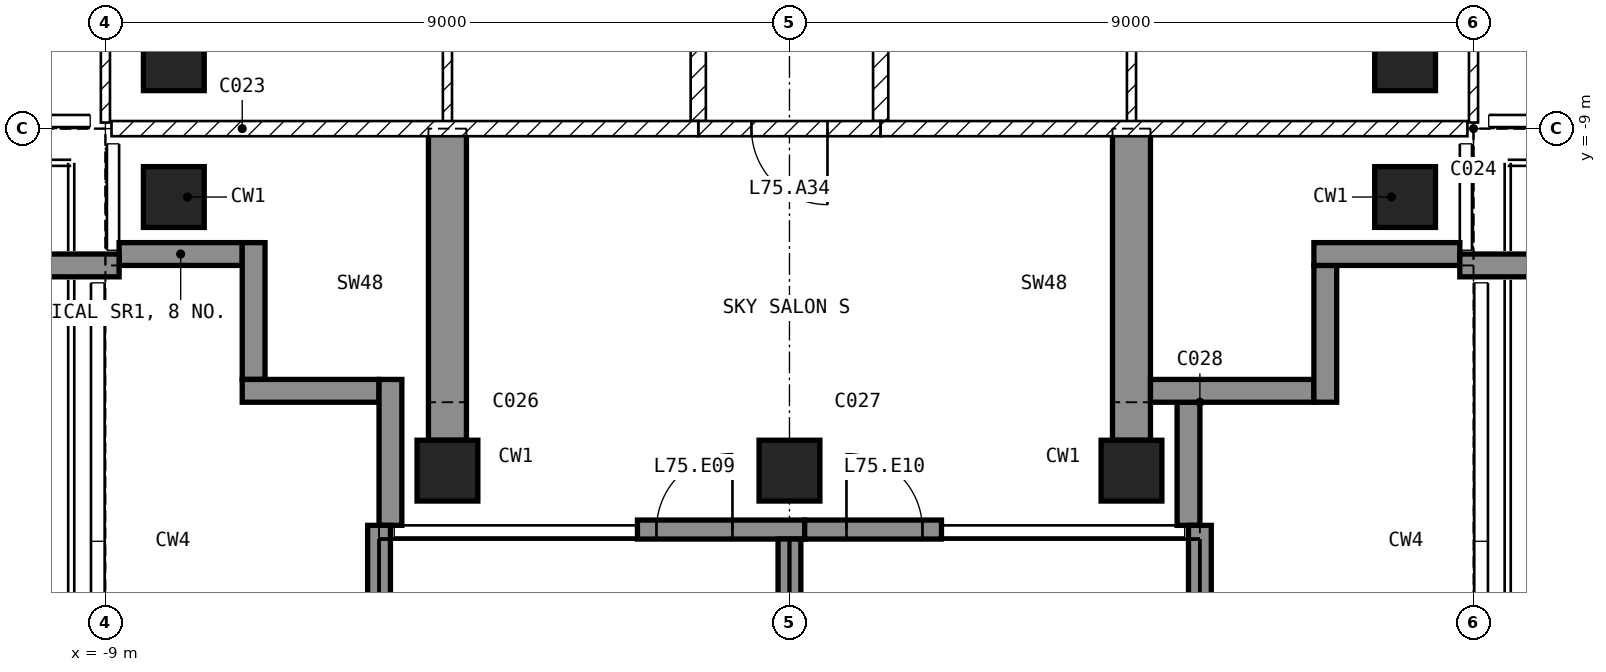
"""IFC4 building model, lengths in metres.
Left out: names, types, materials, properties, quantities, classifications, styles, units other than length and angle.
Written with IfcOpenShell. Run it as: python <this file> out.ifc"""

import sys

from ifc_helpers import new_model, si_unit, direction, frame, frame_2d, origin, origin_2d, place, context, subcontext, project, spatial, polyline, rectangle, outline, extrude, element, fill, save


model = new_model("IFC4")
c1 = context("Model", 3, precision=1e-05, world=origin(), true_north=direction((0.0, 1.0)))
c2 = subcontext(c1, "Body", "Model", "MODEL_VIEW")
j1 = project(units=[si_unit("LENGTHUNIT", "METRE"), si_unit("PLANEANGLEUNIT", "RADIAN")], contexts=[c1])
p1 = place(None, origin())
s1 = spatial("IfcSite", under=j1, at=p1, CompositionType="ELEMENT")
p2 = place(p1, origin())
s2 = spatial("IfcBuilding", under=s1, at=p2, CompositionType="ELEMENT")
p3 = place(p2, frame((0.0, 0.0, 294.6)))
s3 = spatial("IfcBuildingStorey", under=s2, at=p3, CompositionType="ELEMENT", Elevation=294.6)
for number, where, z_axis, x_axis in (
    (1, (-8.1, -9.9, -0.25), (0.0, 0.0, 1.0), (1.0, 0.0, 0.0)),
    (2, (-8.1, -8.1, -0.25), (0.0, 0.0, 1.0), (1.0, 0.0, 0.0)),
    (3, (-4.5, -13.5, -0.25), (0.0, 0.0, 1.0), (1.0, 0.0, 0.0)),
    (4, (0.0, -13.5, -0.25), (0.0, 0.0, 1.0), (1.0, 0.0, 0.0)),
    (5, (4.5, -13.5, -0.25), (0.0, 0.0, 1.0), (1.0, 0.0, 0.0)),
    (6, (8.1, -9.9, -0.25), (0.0, 0.0, 1.0), (1.0, 0.0, 0.0)),
    (7, (8.1, -8.1, -0.25), (0.0, 0.0, 1.0), (1.0, 0.0, 0.0)),
):
    element("IfcColumn", number, at=place(p3, frame(where, z_axis=z_axis, x_axis=x_axis)), inside=s3, PredefinedType="COLUMN", context=c2, shape_type="SweptSolid", body=[
        extrude(rectangle(XDim=0.8, YDim=0.8, at=origin_2d()), origin(), (0.0, 0.0, 1.0), 4.2),
    ])
for number, where, z_axis, x_axis in (
    (8, (-4.75, -13.1, -0.25), (1.0, 0.0, 0.0), (0.0, 1.0, 0.0)),
    (9, (4.25, -13.1, -0.25), (1.0, 0.0, 0.0), (0.0, 1.0, 0.0)),
):
    element("IfcWall", number, at=place(p3, frame(where, z_axis=z_axis, x_axis=x_axis)), inside=s3, PredefinedType="SHEAR", context=c2, shape_type="SweptSolid", body=[
        extrude(outline(polyline([(0.0, 0.0), (4.1, 0.0), (4.1, 4.2), (0.0, 4.2), (0.0, 0.0)])), origin(), (0.0, 0.0, 1.0), 0.5),
    ])
p4 = place(p3, frame((-2.0, -14.275, 0.0), z_axis=(0.0, 0.0, 1.0), x_axis=(1.0, 0.0, 0.0)))
e10 = element("IfcWall", 10, at=p4, inside=s3, PredefinedType="SOLIDWALL", context=c2, shape_type="SweptSolid", body=[
    extrude(rectangle(XDim=2.2, YDim=0.25, at=frame_2d((1.1, 0.0))), origin(), (0.0, 0.0, 1.0), 3.95),
])
p5 = place(p4, frame((0.25, 0.0, 0.0)))
e11 = element("IfcOpeningElement", 11, at=p5, cuts=e10, PredefinedType="OPENING", context=c2, shape_type="SweptSolid", body=[
    extrude(rectangle(XDim=1.0, YDim=2.4, at=frame_2d((0.5, 1.2))), frame((0.0, 0.135, 0.0), z_axis=(0.0, -1.0, 0.0), x_axis=(1.0, 0.0, 0.0)), (0.0, 0.0, 1.0), 0.27),
])
p6 = place(p3, frame((0.2, -14.275, 0.0), z_axis=(0.0, 0.0, 1.0), x_axis=(1.0, 0.0, 0.0)))
e12 = element("IfcWall", 12, at=p6, inside=s3, PredefinedType="SOLIDWALL", context=c2, shape_type="SweptSolid", body=[
    extrude(rectangle(XDim=1.8, YDim=0.25, at=frame_2d((0.9, 0.0))), origin(), (0.0, 0.0, 1.0), 3.95),
])
p7 = place(p6, frame((0.55, 0.0, 0.0)))
e13 = element("IfcOpeningElement", 13, at=p7, cuts=e12, PredefinedType="OPENING", context=c2, shape_type="SweptSolid", body=[
    extrude(rectangle(XDim=1.0, YDim=2.4, at=frame_2d((0.5, 1.2))), frame((0.0, 0.135, 0.0), z_axis=(0.0, -1.0, 0.0), x_axis=(1.0, 0.0, 0.0)), (0.0, 0.0, 1.0), 0.27),
])
p8 = place(p3, frame((5.25, -14.22, 0.0), z_axis=(0.0, 0.0, 1.0), x_axis=(0.0, 1.0, 0.0)))
e14 = element("IfcWall", 14, at=p8, inside=s3, PredefinedType="SOLIDWALL", context=c2, shape_type="SweptSolid", body=[
    extrude(rectangle(XDim=1.62, YDim=0.3, at=frame_2d((0.81, 0.0))), origin(), (0.0, 0.0, 1.0), 3.95),
])
p9 = place(p3, frame((4.75, -12.45, 0.0), z_axis=(0.0, 0.0, 1.0), x_axis=(1.0, 0.0, 0.0)))
e15 = element("IfcWall", 15, at=p9, inside=s3, PredefinedType="SOLIDWALL", context=c2, shape_type="SweptSolid", body=[
    extrude(rectangle(XDim=2.15, YDim=0.3, at=frame_2d((1.075, 0.0))), origin(), (0.0, 0.0, 1.0), 3.95),
])
p10 = place(p3, frame((7.05, -12.6, 0.0), z_axis=(0.0, 0.0, 1.0), x_axis=(0.0, 1.0, 0.0)))
e16 = element("IfcWall", 16, at=p10, inside=s3, PredefinedType="SOLIDWALL", context=c2, shape_type="SweptSolid", body=[
    extrude(rectangle(XDim=1.8, YDim=0.3, at=frame_2d((0.9, 0.0))), origin(), (0.0, 0.0, 1.0), 3.95),
])
p11 = place(p3, frame((6.9, -10.65, 0.0), z_axis=(0.0, 0.0, 1.0), x_axis=(1.0, 0.0, 0.0)))
e17 = element("IfcWall", 17, at=p11, inside=s3, PredefinedType="SOLIDWALL", context=c2, shape_type="SweptSolid", body=[
    extrude(rectangle(XDim=1.92, YDim=0.3, at=frame_2d((0.96, 0.0))), origin(), (0.0, 0.0, 1.0), 3.95),
])
p12 = place(p3, frame((-8.82, -10.65, 0.0), z_axis=(0.0, 0.0, 1.0), x_axis=(1.0, 0.0, 0.0)))
e18 = element("IfcWall", 18, at=p12, inside=s3, PredefinedType="SOLIDWALL", context=c2, shape_type="SweptSolid", body=[
    extrude(rectangle(XDim=1.62, YDim=0.3, at=frame_2d((0.81, 0.0))), origin(), (0.0, 0.0, 1.0), 3.95),
])
for number, where, z_axis, x_axis in (
    (19, (-7.05, -10.5, 0.0), (0.0, 0.0, 1.0), (0.0, -1.0, 0.0)),
    (20, (-7.2, -12.45, 0.0), (0.0, 0.0, 1.0), (1.0, 0.0, 0.0)),
):
    element("IfcWall", number, at=place(p3, frame(where, z_axis=z_axis, x_axis=x_axis)), inside=s3, PredefinedType="SOLIDWALL", context=c2, shape_type="SweptSolid", body=[
        extrude(rectangle(XDim=1.8, YDim=0.3, at=frame_2d((0.9, 0.0))), origin(), (0.0, 0.0, 1.0), 3.95),
    ])
p13 = place(p3, frame((-5.25, -12.3, 0.0), z_axis=(0.0, 0.0, 1.0), x_axis=(0.0, -1.0, 0.0)))
e21 = element("IfcWall", 21, at=p13, inside=s3, PredefinedType="SOLIDWALL", context=c2, shape_type="SweptSolid", body=[
    extrude(rectangle(XDim=1.92, YDim=0.3, at=frame_2d((0.96, 0.0))), origin(), (0.0, 0.0, 1.0), 3.95),
])
p14 = place(p3, frame((-8.82, -10.8, 0.0), z_axis=(0.0, 0.0, 1.0), x_axis=(-1.0, 0.0, 0.0)))
e22 = element("IfcWall", 22, at=p14, inside=s3, PredefinedType="SOLIDWALL", context=c2, shape_type="SweptSolid", body=[
    extrude(rectangle(XDim=2.88, YDim=0.3, at=frame_2d((1.44, 0.0))), origin(), (0.0, 0.0, 1.0), 3.95),
])
p15 = place(p3, frame((-5.4, -14.22, 0.0), z_axis=(0.0, 0.0, 1.0), x_axis=(0.0, -1.0, 0.0)))
e23 = element("IfcWall", 23, at=p15, inside=s3, PredefinedType="SOLIDWALL", context=c2, shape_type="SweptSolid", body=[
    extrude(rectangle(XDim=2.88, YDim=0.3, at=frame_2d((1.44, 0.0))), origin(), (0.0, 0.0, 1.0), 3.95),
])
p16 = place(p3, frame((0.0, -14.4, 0.0), z_axis=(0.0, 0.0, 1.0), x_axis=(0.0, -1.0, 0.0)))
e24 = element("IfcWall", 24, at=p16, inside=s3, PredefinedType="SOLIDWALL", context=c2, shape_type="SweptSolid", body=[
    extrude(rectangle(XDim=2.7, YDim=0.3, at=frame_2d((1.35, 0.0))), origin(), (0.0, 0.0, 1.0), 3.95),
])
p17 = place(p3, frame((5.4, -14.22, 0.0), z_axis=(0.0, 0.0, 1.0), x_axis=(0.0, -1.0, 0.0)))
e25 = element("IfcWall", 25, at=p17, inside=s3, PredefinedType="SOLIDWALL", context=c2, shape_type="SweptSolid", body=[
    extrude(rectangle(XDim=2.88, YDim=0.3, at=frame_2d((1.44, 0.0))), origin(), (0.0, 0.0, 1.0), 3.95),
])
p18 = place(p3, frame((8.82, -10.8, 0.0), z_axis=(0.0, 0.0, 1.0), x_axis=(1.0, 0.0, 0.0)))
e26 = element("IfcWall", 26, at=p18, inside=s3, PredefinedType="SOLIDWALL", context=c2, shape_type="SweptSolid", body=[
    extrude(rectangle(XDim=2.88, YDim=0.3, at=frame_2d((1.44, 0.0))), origin(), (0.0, 0.0, 1.0), 3.95),
])
for number, where, z_axis, x_axis in (
    (27, (1.2, -4.6, 0.0), (0.0, 0.0, 1.0), (0.0, -1.0, 0.0)),
    (28, (-1.2, -8.9, 0.0), (0.0, 0.0, 1.0), (0.0, 1.0, 0.0)),
):
    element("IfcWall", number, at=place(p3, frame(where, z_axis=z_axis, x_axis=x_axis)), inside=s3, PredefinedType="PARTITIONING", context=c2, shape_type="SweptSolid", body=[
        extrude(rectangle(XDim=4.3, YDim=0.2, at=frame_2d((2.15, 0.0))), origin(), (0.0, 0.0, 1.0), 3.95),
    ])
p19 = place(p3, frame((1.2, -9.0, 0.0), z_axis=(0.0, 0.0, 1.0), x_axis=(-1.0, 0.0, 0.0)))
e29 = element("IfcWall", 29, at=p19, inside=s3, PredefinedType="PARTITIONING", context=c2, shape_type="SweptSolid", body=[
    extrude(rectangle(XDim=2.4, YDim=0.2, at=frame_2d((1.2, 0.0))), origin(), (0.0, 0.0, 1.0), 3.95),
])
p20 = place(p19, frame((0.7, 0.0, 0.0)))
e30 = element("IfcOpeningElement", 30, at=p20, cuts=e29, PredefinedType="OPENING", context=c2, shape_type="SweptSolid", body=[
    extrude(rectangle(XDim=1.0, YDim=2.1, at=frame_2d((0.5, 1.05))), frame((0.0, 0.11, 0.0), z_axis=(0.0, -1.0, 0.0), x_axis=(1.0, 0.0, 0.0)), (0.0, 0.0, 1.0), 0.22),
])
p21 = place(p3, frame((9.0, -8.92, 0.0), z_axis=(0.0, 0.0, 1.0), x_axis=(0.0, 1.0, 0.0)))
e31 = element("IfcWall", 31, at=p21, inside=s3, PredefinedType="PARTITIONING", context=c2, shape_type="SweptSolid", body=[
    extrude(rectangle(XDim=7.62, YDim=0.12, at=frame_2d((3.81, 0.0))), origin(), (0.0, 0.0, 1.0), 3.95),
])
p22 = place(p21, frame((2.62, 0.0, 0.0)))
e32 = element("IfcOpeningElement", 32, at=p22, cuts=e31, PredefinedType="OPENING", context=c2, shape_type="SweptSolid", body=[
    extrude(rectangle(XDim=0.9, YDim=2.1, at=frame_2d((0.45, 1.05))), frame((0.0, 0.07, 0.0), z_axis=(0.0, -1.0, 0.0), x_axis=(1.0, 0.0, 0.0)), (0.0, 0.0, 1.0), 0.14),
])
p23 = place(p3, frame((4.5, -9.0, 0.0), z_axis=(0.0, 0.0, 1.0), x_axis=(0.0, 1.0, 0.0)))
e33 = element("IfcWall", 33, at=p23, inside=s3, PredefinedType="PARTITIONING", context=c2, shape_type="SweptSolid", body=[
    extrude(rectangle(XDim=4.5, YDim=0.12, at=frame_2d((2.25, 0.0))), origin(), (0.0, 0.0, 1.0), 3.95),
])
p24 = place(p23, frame((1.8, 0.0, 0.0)))
e34 = element("IfcOpeningElement", 34, at=p24, cuts=e33, PredefinedType="OPENING", context=c2, shape_type="SweptSolid", body=[
    extrude(rectangle(XDim=0.9, YDim=2.1, at=frame_2d((0.45, 1.05))), frame((0.0, 0.07, 0.0), z_axis=(0.0, -1.0, 0.0), x_axis=(1.0, 0.0, 0.0)), (0.0, 0.0, 1.0), 0.14),
])
p25 = place(p3, frame((8.92, -9.0, 0.0), z_axis=(0.0, 0.0, 1.0), x_axis=(-1.0, 0.0, 0.0)))
e35 = element("IfcWall", 35, at=p25, inside=s3, PredefinedType="PARTITIONING", context=c2, shape_type="SweptSolid", body=[
    extrude(rectangle(XDim=7.72, YDim=0.2, at=frame_2d((3.86, 0.0))), origin(), (0.0, 0.0, 1.0), 3.95),
])
p26 = place(p3, frame((-9.0, -1.3, 0.0), z_axis=(0.0, 0.0, 1.0), x_axis=(0.0, -1.0, 0.0)))
e36 = element("IfcWall", 36, at=p26, inside=s3, PredefinedType="PARTITIONING", context=c2, shape_type="SweptSolid", body=[
    extrude(rectangle(XDim=7.62, YDim=0.12, at=frame_2d((3.81, 0.0))), origin(), (0.0, 0.0, 1.0), 3.95),
])
p27 = place(p26, frame((4.1, 0.0, 0.0)))
e37 = element("IfcOpeningElement", 37, at=p27, cuts=e36, PredefinedType="OPENING", context=c2, shape_type="SweptSolid", body=[
    extrude(rectangle(XDim=0.9, YDim=2.1, at=frame_2d((0.45, 1.05))), frame((0.0, 0.07, 0.0), z_axis=(0.0, -1.0, 0.0), x_axis=(1.0, 0.0, 0.0)), (0.0, 0.0, 1.0), 0.14),
])
p28 = place(p3, frame((-4.5, -4.5, 0.0), z_axis=(0.0, 0.0, 1.0), x_axis=(0.0, -1.0, 0.0)))
e38 = element("IfcWall", 38, at=p28, inside=s3, PredefinedType="PARTITIONING", context=c2, shape_type="SweptSolid", body=[
    extrude(rectangle(XDim=4.5, YDim=0.12, at=frame_2d((2.25, 0.0))), origin(), (0.0, 0.0, 1.0), 3.95),
])
p29 = place(p28, frame((1.8, 0.0, 0.0)))
e39 = element("IfcOpeningElement", 39, at=p29, cuts=e38, PredefinedType="OPENING", context=c2, shape_type="SweptSolid", body=[
    extrude(rectangle(XDim=0.9, YDim=2.1, at=frame_2d((0.45, 1.05))), frame((0.0, 0.07, 0.0), z_axis=(0.0, -1.0, 0.0), x_axis=(1.0, 0.0, 0.0)), (0.0, 0.0, 1.0), 0.14),
])
p30 = place(p3, frame((-1.2, -9.0, 0.0), z_axis=(0.0, 0.0, 1.0), x_axis=(-1.0, 0.0, 0.0)))
e40 = element("IfcWall", 40, at=p30, inside=s3, PredefinedType="PARTITIONING", context=c2, shape_type="SweptSolid", body=[
    extrude(rectangle(XDim=7.72, YDim=0.2, at=frame_2d((3.86, 0.0))), origin(), (0.0, 0.0, 1.0), 3.95),
])
p31 = place(p5, origin())
e41 = element("IfcDoor", 41, at=p31, inside=s3, OperationType="SINGLE_SWING_RIGHT", PredefinedType="DOOR", context=c2, shape_type="SweptSolid", body=[
    extrude(rectangle(XDim=1.0, YDim=2.4, at=frame_2d((0.5, 1.2))), frame((0.0, 0.025, 0.0), z_axis=(0.0, -1.0, 0.0), x_axis=(1.0, 0.0, 0.0)), (0.0, 0.0, 1.0), 0.05),
])
fill(e11, e41)
p32 = place(p7, origin())
e42 = element("IfcDoor", 42, at=p32, inside=s3, OperationType="SINGLE_SWING_LEFT", PredefinedType="DOOR", context=c2, shape_type="SweptSolid", body=[
    extrude(rectangle(XDim=1.0, YDim=2.4, at=frame_2d((0.5, 1.2))), frame((0.0, 0.025, 0.0), z_axis=(0.0, -1.0, 0.0), x_axis=(1.0, 0.0, 0.0)), (0.0, 0.0, 1.0), 0.05),
])
fill(e13, e42)
p33 = place(p20, origin())
e43 = element("IfcDoor", 43, at=p33, inside=s3, OperationType="SINGLE_SWING_LEFT", PredefinedType="DOOR", context=c2, shape_type="SweptSolid", body=[
    extrude(rectangle(XDim=1.0, YDim=2.1, at=frame_2d((0.5, 1.05))), frame((0.0, 0.025, 0.0), z_axis=(0.0, -1.0, 0.0), x_axis=(1.0, 0.0, 0.0)), (0.0, 0.0, 1.0), 0.05),
])
fill(e30, e43)
save(model, sys.argv[1])
